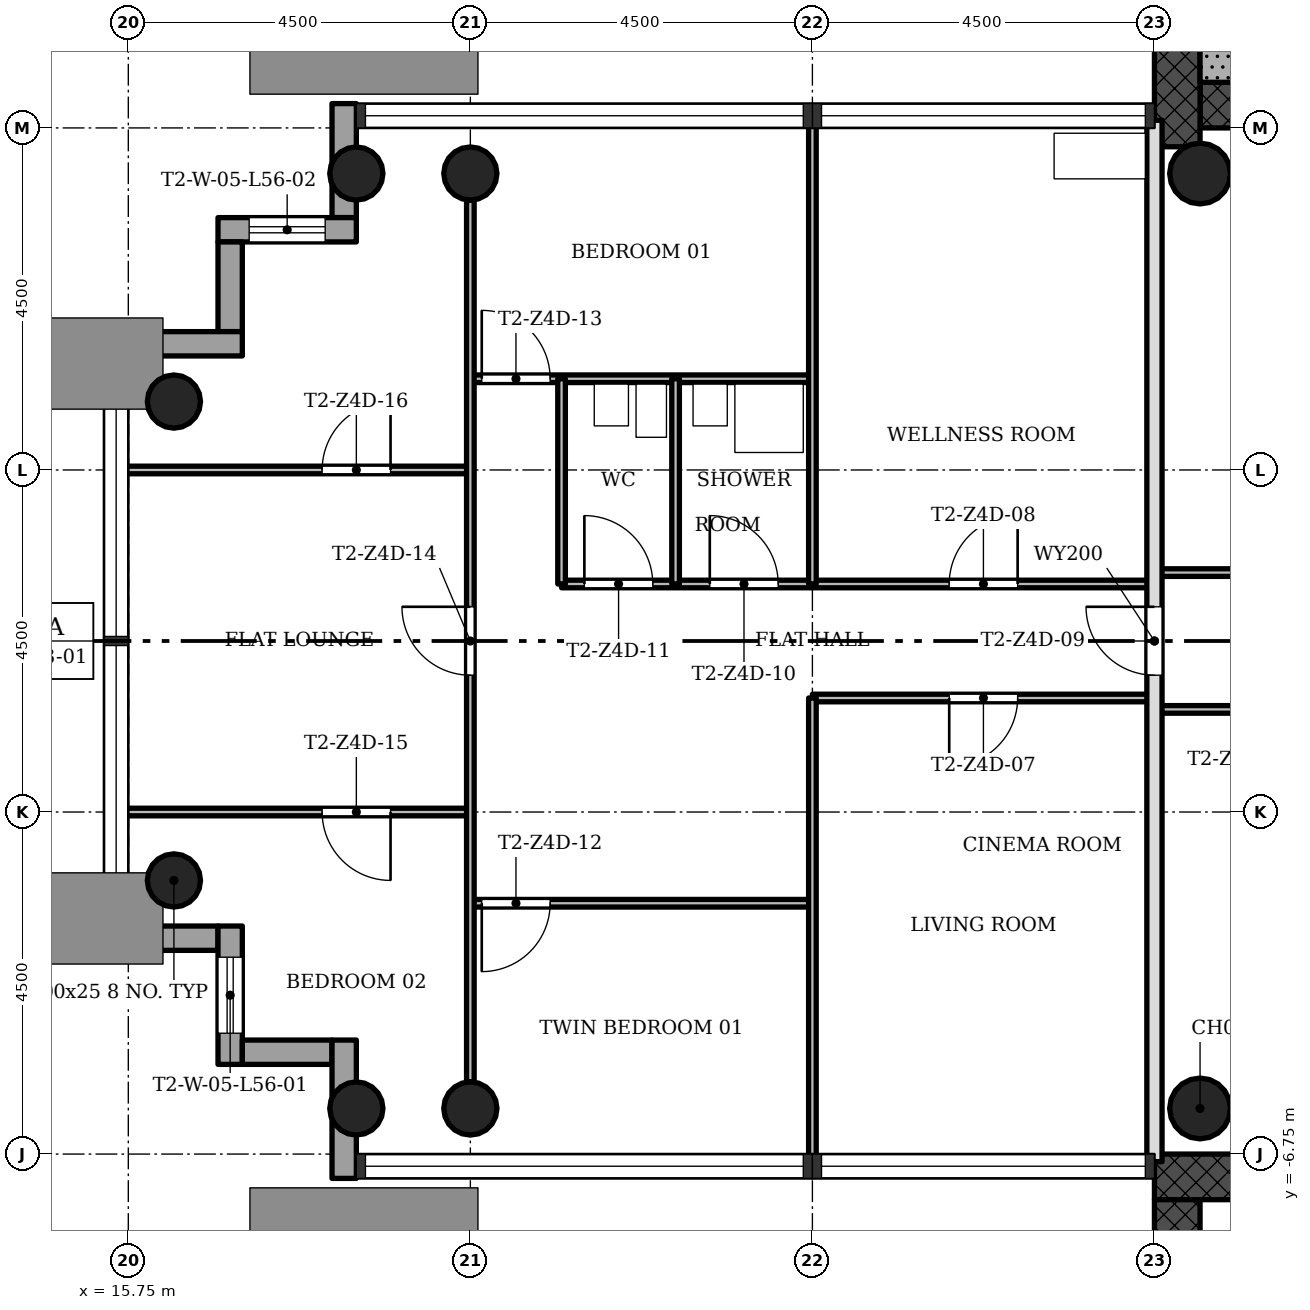
"""IFC4 building model, lengths in metres.
Left out: names, types, materials, properties, quantities, classifications, styles, units other than length and angle.
Written with IfcOpenShell. Run it as: python <this file> out.ifc"""

import sys

from ifc_helpers import new_model, si_unit, direction, frame, frame_2d, origin, origin_2d, place, context, subcontext, project, spatial, rectangle, hollow_circle, extrude, element, fill, save


model = new_model("IFC4")
c1 = context("Model", 3, precision=1e-05, world=origin(), true_north=direction((0.0, 1.0)))
c2 = subcontext(c1, "Body", "Model", "MODEL_VIEW")
j1 = project(units=[si_unit("LENGTHUNIT", "METRE"), si_unit("PLANEANGLEUNIT", "RADIAN")], contexts=[c1])
p1 = place(None, origin())
s1 = spatial("IfcSite", under=j1, at=p1, CompositionType="ELEMENT")
p2 = place(p1, origin())
s2 = spatial("IfcBuilding", under=s1, at=p2, CompositionType="ELEMENT")
p3 = place(p2, frame((0.0, 0.0, 202.8)))
s3 = spatial("IfcBuildingStorey", under=s2, at=p3, CompositionType="ELEMENT", Elevation=202.8)
p4 = place(p3, frame((29.85, 7.05, 0.0), z_axis=(0.0, 0.0, 1.0), x_axis=(1.0, 0.0, 0.0)))
e1 = element("IfcWall", 1, at=p4, inside=s3, PredefinedType="SHEAR", context=c2, shape_type="SweptSolid", body=[
    extrude(rectangle(XDim=12.9, YDim=0.6, at=frame_2d((6.45, 0.0))), origin(), (0.0, 0.0, 1.0), 3.4),
])
p5 = place(p4, frame((5.25, 0.0, 0.0)))
e2 = element("IfcOpeningElement", 2, at=p5, cuts=e1, PredefinedType="OPENING", context=c2, shape_type="SweptSolid", body=[
    extrude(rectangle(XDim=1.8, YDim=2.1, at=frame_2d((0.9, 1.05))), frame((0.0, 0.31, 0.0), z_axis=(0.0, -1.0, 0.0), x_axis=(1.0, 0.0, 0.0)), (0.0, 0.0, 1.0), 0.62),
])
p6 = place(p3, frame((29.55, 15.15, 0.0), z_axis=(0.0, 0.0, 1.0), x_axis=(0.0, -1.0, 0.0)))
e3 = element("IfcWall", 3, at=p6, inside=s3, PredefinedType="SHEAR", context=c2, shape_type="SweptSolid", body=[
    extrude(rectangle(XDim=8.648, YDim=0.6, at=frame_2d((4.324, 0.0))), origin(), (0.0, 0.0, 1.0), 3.4),
])
p7 = place(p3, frame((42.15, -7.05, 0.0), z_axis=(0.0, 0.0, 1.0), x_axis=(-1.0, 0.0, 0.0)))
e4 = element("IfcWall", 4, at=p7, inside=s3, PredefinedType="SHEAR", context=c2, shape_type="SweptSolid", body=[
    extrude(rectangle(XDim=12.9, YDim=0.6, at=frame_2d((6.45, 0.0))), origin(), (0.0, 0.0, 1.0), 3.4),
])
p8 = place(p7, frame((5.25, 0.0, 0.0)))
e5 = element("IfcOpeningElement", 5, at=p8, cuts=e4, PredefinedType="OPENING", context=c2, shape_type="SweptSolid", body=[
    extrude(rectangle(XDim=1.8, YDim=2.1, at=frame_2d((0.9, 1.05))), frame((0.0, 0.31, 0.0), z_axis=(0.0, -1.0, 0.0), x_axis=(1.0, 0.0, 0.0)), (0.0, 0.0, 1.0), 0.62),
])
p9 = place(p3, frame((29.55, -7.35, 0.0), z_axis=(0.0, 0.0, 1.0), x_axis=(0.0, -1.0, 0.0)))
e6 = element("IfcWall", 6, at=p9, inside=s3, PredefinedType="SHEAR", context=c2, shape_type="SweptSolid", body=[
    extrude(rectangle(XDim=8.4, YDim=0.6, at=frame_2d((4.2, 0.0))), origin(), (0.0, 0.0, 1.0), 3.4),
])
for number, where, z_axis, x_axis in (
    (7, (20.25, 6.15, 0.0), (0.0, 0.0, 1.0), (1.0, 0.0, 0.0)),
    (8, (20.25, -6.15, 0.0), (0.0, 0.0, 1.0), (1.0, 0.0, 0.0)),
    (9, (18.75, 6.15, 0.0), (0.0, 0.0, 1.0), (1.0, 0.0, 0.0)),
    (10, (18.75, -6.15, 0.0), (0.0, 0.0, 1.0), (1.0, 0.0, 0.0)),
    (11, (16.35, 3.15, 0.0), (0.0, 0.0, 1.0), (1.0, 0.0, 0.0)),
    (12, (16.35, -3.15, 0.0), (0.0, 0.0, 1.0), (1.0, 0.0, 0.0)),
):
    element("IfcColumn", number, at=place(p3, frame(where, z_axis=z_axis, x_axis=x_axis)), inside=s3, PredefinedType="COLUMN", context=c2, shape_type="SweptSolid", body=[
        extrude(hollow_circle(Radius=0.35, WallThickness=0.025, at=origin_2d()), origin(), (0.0, 0.0, 1.0), 3.4),
    ])
for number, where, z_axis, x_axis in (
    (13, (29.85, 6.15, 0.0), (0.0, 0.0, 1.0), (1.0, 0.0, 0.0)),
    (14, (29.85, -6.15, 0.0), (0.0, 0.0, 1.0), (1.0, 0.0, 0.0)),
):
    element("IfcColumn", number, at=place(p3, frame(where, z_axis=z_axis, x_axis=x_axis)), inside=s3, PredefinedType="COLUMN", context=c2, shape_type="SweptSolid", body=[
        extrude(hollow_circle(Radius=0.4, WallThickness=0.028, at=origin_2d()), origin(), (0.0, 0.0, 1.0), 3.4),
    ])
p10 = place(p3, frame((18.59, 7.07, -0.3), z_axis=(0.0, 0.0, 1.0), x_axis=(0.0, -1.0, 0.0)))
e15 = element("IfcWall", 15, at=p10, inside=s3, PredefinedType="STANDARD", context=c2, shape_type="SweptSolid", body=[
    extrude(rectangle(XDim=1.5, YDim=0.32, at=frame_2d((0.75, 0.0))), origin(), (0.0, 0.0, 1.0), 3.4),
])
p11 = place(p3, frame((18.75, 5.41, -0.3), z_axis=(0.0, 0.0, 1.0), x_axis=(-1.0, 0.0, 0.0)))
e16 = element("IfcWall", 16, at=p11, inside=s3, PredefinedType="STANDARD", context=c2, shape_type="SweptSolid", body=[
    extrude(rectangle(XDim=1.82, YDim=0.32, at=frame_2d((0.91, 0.0))), origin(), (0.0, 0.0, 1.0), 3.4),
])
p12 = place(p11, frame((0.41, 0.0, 1.2)))
e17 = element("IfcOpeningElement", 17, at=p12, cuts=e16, PredefinedType="OPENING", context=c2, shape_type="SweptSolid", body=[
    extrude(rectangle(XDim=1.0, YDim=1.5, at=frame_2d((0.5, 0.75))), frame((0.0, 0.17, 0.0), z_axis=(0.0, -1.0, 0.0), x_axis=(1.0, 0.0, 0.0)), (0.0, 0.0, 1.0), 0.34),
])
p13 = place(p3, frame((17.09, 5.25, -0.3), z_axis=(0.0, 0.0, 1.0), x_axis=(0.0, -1.0, 0.0)))
e18 = element("IfcWall", 18, at=p13, inside=s3, PredefinedType="STANDARD", context=c2, shape_type="SweptSolid", body=[
    extrude(rectangle(XDim=1.18, YDim=0.32, at=frame_2d((0.59, 0.0))), origin(), (0.0, 0.0, 1.0), 3.4),
])
p14 = place(p3, frame((17.25, 3.91, -0.3), z_axis=(0.0, 0.0, 1.0), x_axis=(-1.0, 0.0, 0.0)))
e19 = element("IfcWall", 19, at=p14, inside=s3, PredefinedType="STANDARD", context=c2, shape_type="SweptSolid", body=[
    extrude(rectangle(XDim=1.82, YDim=0.32, at=frame_2d((0.91, 0.0))), origin(), (0.0, 0.0, 1.0), 3.4),
])
p15 = place(p3, frame((15.43, -3.91, -0.3), z_axis=(0.0, 0.0, 1.0), x_axis=(1.0, 0.0, 0.0)))
e20 = element("IfcWall", 20, at=p15, inside=s3, PredefinedType="STANDARD", context=c2, shape_type="SweptSolid", body=[
    extrude(rectangle(XDim=1.5, YDim=0.32, at=frame_2d((0.75, 0.0))), origin(), (0.0, 0.0, 1.0), 3.4),
])
p16 = place(p3, frame((17.09, -3.75, -0.3), z_axis=(0.0, 0.0, 1.0), x_axis=(0.0, -1.0, 0.0)))
e21 = element("IfcWall", 21, at=p16, inside=s3, PredefinedType="STANDARD", context=c2, shape_type="SweptSolid", body=[
    extrude(rectangle(XDim=1.82, YDim=0.32, at=frame_2d((0.91, 0.0))), origin(), (0.0, 0.0, 1.0), 3.4),
])
p17 = place(p16, frame((0.41, 0.0, 1.2)))
e22 = element("IfcOpeningElement", 22, at=p17, cuts=e21, PredefinedType="OPENING", context=c2, shape_type="SweptSolid", body=[
    extrude(rectangle(XDim=1.0, YDim=1.5, at=frame_2d((0.5, 0.75))), frame((0.0, 0.17, 0.0), z_axis=(0.0, -1.0, 0.0), x_axis=(1.0, 0.0, 0.0)), (0.0, 0.0, 1.0), 0.34),
])
p18 = place(p3, frame((17.25, -5.41, -0.3), z_axis=(0.0, 0.0, 1.0), x_axis=(1.0, 0.0, 0.0)))
e23 = element("IfcWall", 23, at=p18, inside=s3, PredefinedType="STANDARD", context=c2, shape_type="SweptSolid", body=[
    extrude(rectangle(XDim=1.18, YDim=0.32, at=frame_2d((0.59, 0.0))), origin(), (0.0, 0.0, 1.0), 3.4),
])
p19 = place(p3, frame((18.59, -5.25, -0.3), z_axis=(0.0, 0.0, 1.0), x_axis=(0.0, -1.0, 0.0)))
e24 = element("IfcWall", 24, at=p19, inside=s3, PredefinedType="STANDARD", context=c2, shape_type="SweptSolid", body=[
    extrude(rectangle(XDim=1.82, YDim=0.32, at=frame_2d((0.91, 0.0))), origin(), (0.0, 0.0, 1.0), 3.4),
])
p20 = place(p3, frame((24.75, -3.45, 0.0), z_axis=(0.0, 0.0, 1.0), x_axis=(-1.0, 0.0, 0.0)))
e25 = element("IfcWall", 25, at=p20, inside=s3, PredefinedType="PARTITIONING", context=c2, shape_type="SweptSolid", body=[
    extrude(rectangle(XDim=4.5, YDim=0.1, at=frame_2d((2.25, 0.0))), origin(), (0.0, 0.0, 1.0), 3.0),
])
p21 = place(p20, frame((3.45, 0.0, 0.0)))
e26 = element("IfcOpeningElement", 26, at=p21, cuts=e25, PredefinedType="OPENING", context=c2, shape_type="SweptSolid", body=[
    extrude(rectangle(XDim=0.9, YDim=2.1, at=frame_2d((0.45, 1.05))), frame((0.0, 0.06, 0.0), z_axis=(0.0, -1.0, 0.0), x_axis=(1.0, 0.0, 0.0)), (0.0, 0.0, 1.0), 0.12),
])
p22 = place(p3, frame((20.25, -2.25, 0.0), z_axis=(0.0, 0.0, 1.0), x_axis=(-1.0, 0.0, 0.0)))
e27 = element("IfcWall", 27, at=p22, inside=s3, PredefinedType="PARTITIONING", context=c2, shape_type="SweptSolid", body=[
    extrude(rectangle(XDim=4.6, YDim=0.1, at=frame_2d((2.3, 0.0))), origin(), (0.0, 0.0, 1.0), 3.0),
])
p23 = place(p22, frame((1.05, 0.0, 0.0)))
e28 = element("IfcOpeningElement", 28, at=p23, cuts=e27, PredefinedType="OPENING", context=c2, shape_type="SweptSolid", body=[
    extrude(rectangle(XDim=0.9, YDim=2.1, at=frame_2d((0.45, 1.05))), frame((0.0, 0.06, 0.0), z_axis=(0.0, -1.0, 0.0), x_axis=(1.0, 0.0, 0.0)), (0.0, 0.0, 1.0), 0.12),
])
p24 = place(p3, frame((31.5, -0.9, 0.0), z_axis=(0.0, 0.0, 1.0), x_axis=(-1.0, 0.0, 0.0)))
e29 = element("IfcWall", 29, at=p24, inside=s3, PredefinedType="PARTITIONING", context=c2, shape_type="SweptSolid", body=[
    extrude(rectangle(XDim=2.25, YDim=0.1, at=frame_2d((1.125, 0.0))), origin(), (0.0, 0.0, 1.0), 3.0),
])
p25 = place(p3, frame((29.25, -0.75, 0.0), z_axis=(0.0, 0.0, 1.0), x_axis=(-1.0, 0.0, 0.0)))
e30 = element("IfcWall", 30, at=p25, inside=s3, PredefinedType="PARTITIONING", context=c2, shape_type="SweptSolid", body=[
    extrude(rectangle(XDim=4.5, YDim=0.1, at=frame_2d((2.25, 0.0))), origin(), (0.0, 0.0, 1.0), 3.0),
])
p26 = place(p25, frame((1.8, 0.0, 0.0)))
e31 = element("IfcOpeningElement", 31, at=p26, cuts=e30, PredefinedType="OPENING", context=c2, shape_type="SweptSolid", body=[
    extrude(rectangle(XDim=0.9, YDim=2.1, at=frame_2d((0.45, 1.05))), frame((0.0, 0.06, 0.0), z_axis=(0.0, -1.0, 0.0), x_axis=(1.0, 0.0, 0.0)), (0.0, 0.0, 1.0), 0.12),
])
p27 = place(p3, frame((29.25, 0.75, 0.0), z_axis=(0.0, 0.0, 1.0), x_axis=(-1.0, 0.0, 0.0)))
e32 = element("IfcWall", 32, at=p27, inside=s3, PredefinedType="PARTITIONING", context=c2, shape_type="SweptSolid", body=[
    extrude(rectangle(XDim=7.8, YDim=0.1, at=frame_2d((3.9, 0.0))), origin(), (0.0, 0.0, 1.0), 3.0),
])
p28 = place(p27, frame((1.8, 0.0, 0.0)))
e33 = element("IfcOpeningElement", 33, at=p28, cuts=e32, PredefinedType="OPENING", context=c2, shape_type="SweptSolid", body=[
    extrude(rectangle(XDim=0.9, YDim=2.1, at=frame_2d((0.45, 1.05))), frame((0.0, 0.06, 0.0), z_axis=(0.0, -1.0, 0.0), x_axis=(1.0, 0.0, 0.0)), (0.0, 0.0, 1.0), 0.12),
])
p29 = place(p27, frame((4.95, 0.0, 0.0)))
e34 = element("IfcOpeningElement", 34, at=p29, cuts=e32, PredefinedType="OPENING", context=c2, shape_type="SweptSolid", body=[
    extrude(rectangle(XDim=0.9, YDim=2.1, at=frame_2d((0.45, 1.05))), frame((0.0, 0.06, 0.0), z_axis=(0.0, -1.0, 0.0), x_axis=(1.0, 0.0, 0.0)), (0.0, 0.0, 1.0), 0.12),
])
p30 = place(p27, frame((6.6, 0.0, 0.0)))
e35 = element("IfcOpeningElement", 35, at=p30, cuts=e32, PredefinedType="OPENING", context=c2, shape_type="SweptSolid", body=[
    extrude(rectangle(XDim=0.9, YDim=2.1, at=frame_2d((0.45, 1.05))), frame((0.0, 0.06, 0.0), z_axis=(0.0, -1.0, 0.0), x_axis=(1.0, 0.0, 0.0)), (0.0, 0.0, 1.0), 0.12),
])
p31 = place(p3, frame((31.5, 0.9, 0.0), z_axis=(0.0, 0.0, 1.0), x_axis=(-1.0, 0.0, 0.0)))
e36 = element("IfcWall", 36, at=p31, inside=s3, PredefinedType="PARTITIONING", context=c2, shape_type="SweptSolid", body=[
    extrude(rectangle(XDim=2.25, YDim=0.1, at=frame_2d((1.125, 0.0))), origin(), (0.0, 0.0, 1.0), 3.0),
])
p32 = place(p3, frame((20.25, 2.25, 0.0), z_axis=(0.0, 0.0, 1.0), x_axis=(-1.0, 0.0, 0.0)))
e37 = element("IfcWall", 37, at=p32, inside=s3, PredefinedType="PARTITIONING", context=c2, shape_type="SweptSolid", body=[
    extrude(rectangle(XDim=4.6, YDim=0.1, at=frame_2d((2.3, 0.0))), origin(), (0.0, 0.0, 1.0), 3.0),
])
p33 = place(p32, frame((1.05, 0.0, 0.0)))
e38 = element("IfcOpeningElement", 38, at=p33, cuts=e37, PredefinedType="OPENING", context=c2, shape_type="SweptSolid", body=[
    extrude(rectangle(XDim=0.9, YDim=2.1, at=frame_2d((0.45, 1.05))), frame((0.0, 0.06, 0.0), z_axis=(0.0, -1.0, 0.0), x_axis=(1.0, 0.0, 0.0)), (0.0, 0.0, 1.0), 0.12),
])
p34 = place(p3, frame((24.75, 3.45, 0.0), z_axis=(0.0, 0.0, 1.0), x_axis=(-1.0, 0.0, 0.0)))
e39 = element("IfcWall", 39, at=p34, inside=s3, PredefinedType="PARTITIONING", context=c2, shape_type="SweptSolid", body=[
    extrude(rectangle(XDim=4.5, YDim=0.1, at=frame_2d((2.25, 0.0))), origin(), (0.0, 0.0, 1.0), 3.0),
])
p35 = place(p34, frame((3.45, 0.0, 0.0)))
e40 = element("IfcOpeningElement", 40, at=p35, cuts=e39, PredefinedType="OPENING", context=c2, shape_type="SweptSolid", body=[
    extrude(rectangle(XDim=0.9, YDim=2.1, at=frame_2d((0.45, 1.05))), frame((0.0, 0.06, 0.0), z_axis=(0.0, -1.0, 0.0), x_axis=(1.0, 0.0, 0.0)), (0.0, 0.0, 1.0), 0.12),
])
p36 = place(p3, frame((29.25, -6.85, 0.0), z_axis=(0.0, 0.0, 1.0), x_axis=(0.0, 1.0, 0.0)))
e41 = element("IfcWall", 41, at=p36, inside=s3, PredefinedType="SOLIDWALL", context=c2, shape_type="SweptSolid", body=[
    extrude(rectangle(XDim=13.7, YDim=0.2, at=frame_2d((6.85, 0.0))), origin(), (0.0, 0.0, 1.0), 3.0),
])
p37 = place(p36, frame((6.4, 0.0, 0.0)))
e42 = element("IfcOpeningElement", 42, at=p37, cuts=e41, PredefinedType="OPENING", context=c2, shape_type="SweptSolid", body=[
    extrude(rectangle(XDim=0.9, YDim=2.1, at=frame_2d((0.45, 1.05))), frame((0.0, 0.11, 0.0), z_axis=(0.0, -1.0, 0.0), x_axis=(1.0, 0.0, 0.0)), (0.0, 0.0, 1.0), 0.22),
])
for number, where, z_axis, x_axis in (
    (43, (24.75, -6.85, 0.0), (0.0, 0.0, 1.0), (0.0, 1.0, 0.0)),
    (44, (24.75, 0.75, 0.0), (0.0, 0.0, 1.0), (0.0, 1.0, 0.0)),
):
    element("IfcWall", number, at=place(p3, frame(where, z_axis=z_axis, x_axis=x_axis)), inside=s3, PredefinedType="PARTITIONING", context=c2, shape_type="SweptSolid", body=[
        extrude(rectangle(XDim=6.1, YDim=0.1, at=frame_2d((3.05, 0.0))), origin(), (0.0, 0.0, 1.0), 3.0),
    ])
for number, where, z_axis, x_axis in (
    (45, (22.95, 0.75, 0.0), (0.0, 0.0, 1.0), (0.0, 1.0, 0.0)),
    (46, (21.45, 0.75, 0.0), (0.0, 0.0, 1.0), (0.0, 1.0, 0.0)),
):
    element("IfcWall", number, at=place(p3, frame(where, z_axis=z_axis, x_axis=x_axis)), inside=s3, PredefinedType="PARTITIONING", context=c2, shape_type="SweptSolid", body=[
        extrude(rectangle(XDim=2.7, YDim=0.1, at=frame_2d((1.35, 0.0))), origin(), (0.0, 0.0, 1.0), 3.0),
    ])
p38 = place(p3, frame((20.25, -5.8, 0.0), z_axis=(0.0, 0.0, 1.0), x_axis=(0.0, 1.0, 0.0)))
e47 = element("IfcWall", 47, at=p38, inside=s3, PredefinedType="PARTITIONING", context=c2, shape_type="SweptSolid", body=[
    extrude(rectangle(XDim=11.6, YDim=0.1, at=frame_2d((5.8, 0.0))), origin(), (0.0, 0.0, 1.0), 3.0),
])
p39 = place(p38, frame((5.35, 0.0, 0.0)))
e48 = element("IfcOpeningElement", 48, at=p39, cuts=e47, PredefinedType="OPENING", context=c2, shape_type="SweptSolid", body=[
    extrude(rectangle(XDim=0.9, YDim=2.1, at=frame_2d((0.45, 1.05))), frame((0.0, 0.06, 0.0), z_axis=(0.0, -1.0, 0.0), x_axis=(1.0, 0.0, 0.0)), (0.0, 0.0, 1.0), 0.12),
])
p40 = place(p3, frame((34.15, 7.65, 0.0), z_axis=(0.0, 0.0, 1.0), x_axis=(-1.0, 0.0, 0.0)))
e49 = element("IfcWall", 49, at=p40, inside=s3, PredefinedType="SHEAR", context=c2, shape_type="SweptSolid", body=[
    extrude(rectangle(XDim=4.3, YDim=0.6, at=frame_2d((2.15, 0.0))), origin(), (0.0, 0.0, 1.0), 3.4),
])
p41 = place(p26, origin())
e50 = element("IfcDoor", 50, at=p41, inside=s3, OperationType="SINGLE_SWING_LEFT", PredefinedType="DOOR", context=c2, shape_type="SweptSolid", body=[
    extrude(rectangle(XDim=0.9, YDim=2.1, at=frame_2d((0.45, 1.05))), frame((0.0, 0.025, 0.0), z_axis=(0.0, -1.0, 0.0), x_axis=(1.0, 0.0, 0.0)), (0.0, 0.0, 1.0), 0.05),
])
fill(e31, e50)
p42 = place(p28, origin())
e51 = element("IfcDoor", 51, at=p42, inside=s3, OperationType="SINGLE_SWING_LEFT", PredefinedType="DOOR", context=c2, shape_type="SweptSolid", body=[
    extrude(rectangle(XDim=0.9, YDim=2.1, at=frame_2d((0.45, 1.05))), frame((0.0, 0.025, 0.0), z_axis=(0.0, -1.0, 0.0), x_axis=(1.0, 0.0, 0.0)), (0.0, 0.0, 1.0), 0.05),
])
fill(e33, e51)
p43 = place(p37, origin())
e52 = element("IfcDoor", 52, at=p43, inside=s3, OperationType="SINGLE_SWING_LEFT", PredefinedType="DOOR", context=c2, shape_type="SweptSolid", body=[
    extrude(rectangle(XDim=0.9, YDim=2.1, at=frame_2d((0.45, 1.05))), frame((0.0, 0.025, 0.0), z_axis=(0.0, -1.0, 0.0), x_axis=(1.0, 0.0, 0.0)), (0.0, 0.0, 1.0), 0.05),
])
fill(e42, e52)
p44 = place(p29, origin())
e53 = element("IfcDoor", 53, at=p44, inside=s3, OperationType="SINGLE_SWING_RIGHT", PredefinedType="DOOR", context=c2, shape_type="SweptSolid", body=[
    extrude(rectangle(XDim=0.9, YDim=2.1, at=frame_2d((0.45, 1.05))), frame((0.0, 0.025, 0.0), z_axis=(0.0, -1.0, 0.0), x_axis=(1.0, 0.0, 0.0)), (0.0, 0.0, 1.0), 0.05),
])
fill(e34, e53)
p45 = place(p30, origin())
e54 = element("IfcDoor", 54, at=p45, inside=s3, OperationType="SINGLE_SWING_RIGHT", PredefinedType="DOOR", context=c2, shape_type="SweptSolid", body=[
    extrude(rectangle(XDim=0.9, YDim=2.1, at=frame_2d((0.45, 1.05))), frame((0.0, 0.025, 0.0), z_axis=(0.0, -1.0, 0.0), x_axis=(1.0, 0.0, 0.0)), (0.0, 0.0, 1.0), 0.05),
])
fill(e35, e54)
p46 = place(p21, origin())
e55 = element("IfcDoor", 55, at=p46, inside=s3, OperationType="SINGLE_SWING_LEFT", PredefinedType="DOOR", context=c2, shape_type="SweptSolid", body=[
    extrude(rectangle(XDim=0.9, YDim=2.1, at=frame_2d((0.45, 1.05))), frame((0.0, 0.025, 0.0), z_axis=(0.0, -1.0, 0.0), x_axis=(1.0, 0.0, 0.0)), (0.0, 0.0, 1.0), 0.05),
])
fill(e26, e55)
p47 = place(p35, origin())
e56 = element("IfcDoor", 56, at=p47, inside=s3, OperationType="SINGLE_SWING_RIGHT", PredefinedType="DOOR", context=c2, shape_type="SweptSolid", body=[
    extrude(rectangle(XDim=0.9, YDim=2.1, at=frame_2d((0.45, 1.05))), frame((0.0, 0.025, 0.0), z_axis=(0.0, -1.0, 0.0), x_axis=(1.0, 0.0, 0.0)), (0.0, 0.0, 1.0), 0.05),
])
fill(e40, e56)
p48 = place(p39, origin())
e57 = element("IfcDoor", 57, at=p48, inside=s3, OperationType="SINGLE_SWING_LEFT", PredefinedType="DOOR", context=c2, shape_type="SweptSolid", body=[
    extrude(rectangle(XDim=0.9, YDim=2.1, at=frame_2d((0.45, 1.05))), frame((0.0, 0.025, 0.0), z_axis=(0.0, -1.0, 0.0), x_axis=(1.0, 0.0, 0.0)), (0.0, 0.0, 1.0), 0.05),
])
fill(e48, e57)
p49 = place(p23, origin())
e58 = element("IfcDoor", 58, at=p49, inside=s3, OperationType="SINGLE_SWING_RIGHT", PredefinedType="DOOR", context=c2, shape_type="SweptSolid", body=[
    extrude(rectangle(XDim=0.9, YDim=2.1, at=frame_2d((0.45, 1.05))), frame((0.0, 0.025, 0.0), z_axis=(0.0, -1.0, 0.0), x_axis=(1.0, 0.0, 0.0)), (0.0, 0.0, 1.0), 0.05),
])
fill(e28, e58)
p50 = place(p33, origin())
e59 = element("IfcDoor", 59, at=p50, inside=s3, OperationType="SINGLE_SWING_LEFT", PredefinedType="DOOR", context=c2, shape_type="SweptSolid", body=[
    extrude(rectangle(XDim=0.9, YDim=2.1, at=frame_2d((0.45, 1.05))), frame((0.0, 0.025, 0.0), z_axis=(0.0, -1.0, 0.0), x_axis=(1.0, 0.0, 0.0)), (0.0, 0.0, 1.0), 0.05),
])
fill(e38, e59)
p51 = place(p17, origin())
e60 = element("IfcWindow", 60, at=p51, inside=s3, PartitioningType="SINGLE_PANEL", PredefinedType="WINDOW", context=c2, shape_type="SweptSolid", body=[
    extrude(rectangle(XDim=1.0, YDim=1.5, at=frame_2d((0.5, 0.75))), frame((0.0, 0.03, 0.0), z_axis=(0.0, -1.0, 0.0), x_axis=(1.0, 0.0, 0.0)), (0.0, 0.0, 1.0), 0.06),
])
fill(e22, e60)
p52 = place(p12, origin())
e61 = element("IfcWindow", 61, at=p52, inside=s3, PartitioningType="SINGLE_PANEL", PredefinedType="WINDOW", context=c2, shape_type="SweptSolid", body=[
    extrude(rectangle(XDim=1.0, YDim=1.5, at=frame_2d((0.5, 0.75))), frame((0.0, 0.03, 0.0), z_axis=(0.0, -1.0, 0.0), x_axis=(1.0, 0.0, 0.0)), (0.0, 0.0, 1.0), 0.06),
])
fill(e17, e61)
save(model, sys.argv[1])
